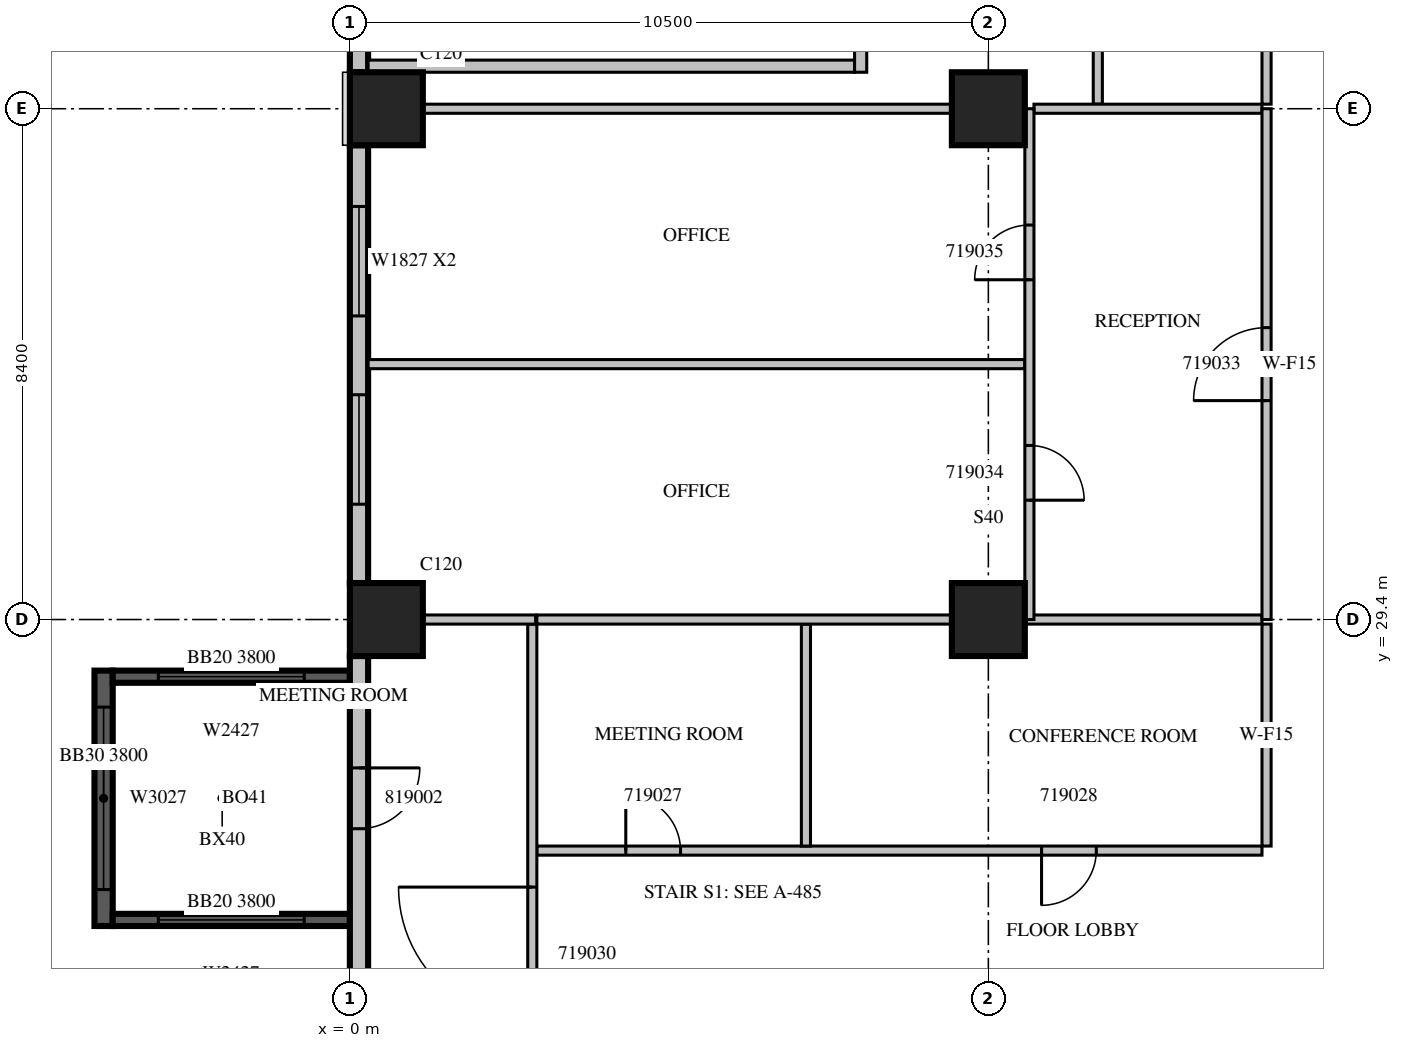
"""IFC4 building model, lengths in metres.
Left out: names, types, materials, properties, quantities, classifications, styles, units other than length and angle.
Written with IfcOpenShell. Run it as: python <this file> out.ifc"""

import sys

from ifc_helpers import new_model, si_unit, direction, frame, frame_2d, origin, origin_2d, place, context, subcontext, project, spatial, rectangle, extrude, source, transform, mapped, element, fill, save


model = new_model("IFC4")
c1 = context("Model", 3, precision=1e-05, world=origin(), true_north=direction((0.0, 1.0)))
c2 = subcontext(c1, "Body", "Model", "MODEL_VIEW")
j1 = project(units=[si_unit("LENGTHUNIT", "METRE"), si_unit("PLANEANGLEUNIT", "RADIAN")], contexts=[c1])
p1 = place(None, origin())
s1 = spatial("IfcSite", under=j1, at=p1, CompositionType="ELEMENT")
p2 = place(p1, origin())
s2 = spatial("IfcBuilding", under=s1, at=p2, CompositionType="ELEMENT")
p3 = place(p2, frame((0.0, 0.0, 90.9)))
s3 = spatial("IfcBuildingStorey", under=s2, at=p3, CompositionType="ELEMENT", Elevation=90.9)
m1 = source(origin(), c2, "Body", "SweptSolid", [
    extrude(rectangle(XDim=1.2, YDim=1.2, at=origin_2d()), origin(), (0.0, 0.0, 1.0), 4.2),
])
for number, where, z_axis, x_axis in (
    (1, (0.6, 29.4, 0.0), (0.0, 0.0, 1.0), (1.0, 0.0, 0.0)),
    (2, (10.5, 29.4, 0.0), (0.0, 0.0, 1.0), (1.0, 0.0, 0.0)),
    (3, (0.6, 37.8, 0.0), (0.0, 0.0, 1.0), (1.0, 0.0, 0.0)),
    (4, (10.5, 37.8, 0.0), (0.0, 0.0, 1.0), (1.0, 0.0, 0.0)),
):
    element("IfcColumn", number, at=place(p3, frame(where, z_axis=z_axis, x_axis=x_axis)), inside=s3, PredefinedType="COLUMN", context=c2, shape_type="MappedRepresentation", body=[
        mapped(m1, transform((0.0, 0.0, 0.0), scale=1.0)),
    ])
m2 = source(origin(), c2, "Body", "SweptSolid", [
    extrude(rectangle(XDim=4.2, YDim=0.3, at=frame_2d((2.1, 0.0))), origin(), (0.0, 0.0, 1.0), 3.8),
])
p4 = place(p3, frame((-4.05, 28.56, 0.0), z_axis=(0.0, 0.0, 1.0), x_axis=(0.0, -1.0, 0.0)))
e5 = element("IfcWall", 5, at=p4, inside=s3, PredefinedType="SOLIDWALL", context=c2, shape_type="MappedRepresentation", body=[
    mapped(m2, transform((0.0, 0.0, 0.0), scale=1.0)),
])
m3 = source(origin(), c2, "Body", "SweptSolid", [
    extrude(rectangle(XDim=3.0, YDim=2.7, at=frame_2d((1.5, 1.35))), frame((0.0, 0.16, 0.0), z_axis=(0.0, -1.0, 0.0), x_axis=(1.0, 0.0, 0.0)), (0.0, 0.0, 1.0), 0.32),
])
p5 = place(p4, frame((0.6, 0.0, 0.6)))
e6 = element("IfcOpeningElement", 6, at=p5, cuts=e5, PredefinedType="OPENING", context=c2, shape_type="MappedRepresentation", body=[
    mapped(m3, transform((0.0, 0.0, 0.0), scale=1.0)),
])
m4 = source(origin(), c2, "Body", "SweptSolid", [
    extrude(rectangle(XDim=3.9, YDim=0.2, at=frame_2d((1.95, 0.0))), origin(), (0.0, 0.0, 1.0), 3.8),
])
p6 = place(p3, frame((0.0, 28.46, 0.0), z_axis=(0.0, 0.0, 1.0), x_axis=(-1.0, 0.0, 0.0)))
e7 = element("IfcWall", 7, at=p6, inside=s3, PredefinedType="SOLIDWALL", context=c2, shape_type="MappedRepresentation", body=[
    mapped(m4, transform((0.0, 0.0, 0.0), scale=1.0)),
])
m5 = source(origin(), c2, "Body", "SweptSolid", [
    extrude(rectangle(XDim=2.4, YDim=2.7, at=frame_2d((1.2, 1.35))), frame((0.0, 0.11, 0.0), z_axis=(0.0, -1.0, 0.0), x_axis=(1.0, 0.0, 0.0)), (0.0, 0.0, 1.0), 0.22),
])
p7 = place(p6, frame((0.75, 0.0, 0.6)))
e8 = element("IfcOpeningElement", 8, at=p7, cuts=e7, PredefinedType="OPENING", context=c2, shape_type="MappedRepresentation", body=[
    mapped(m5, transform((0.0, 0.0, 0.0), scale=1.0)),
])
p8 = place(p3, frame((0.0, 24.46, 0.0), z_axis=(0.0, 0.0, 1.0), x_axis=(-1.0, 0.0, 0.0)))
e9 = element("IfcWall", 9, at=p8, inside=s3, PredefinedType="SOLIDWALL", context=c2, shape_type="MappedRepresentation", body=[
    mapped(m4, transform((0.0, 0.0, 0.0), scale=1.0)),
])
p9 = place(p8, frame((0.75, 0.0, 0.6)))
e10 = element("IfcOpeningElement", 10, at=p9, cuts=e9, PredefinedType="OPENING", context=c2, shape_type="MappedRepresentation", body=[
    mapped(m5, transform((0.0, 0.0, 0.0), scale=1.0)),
])
m6 = source(origin(), c2, "Body", "SweptSolid", [
    extrude(rectangle(XDim=1.8, YDim=0.3, at=frame_2d((0.9, 0.0))), origin(), (0.0, 0.0, 1.0), 3.8),
])
p10 = place(p3, frame((0.15, 40.2, 0.0), z_axis=(0.0, 0.0, 1.0), x_axis=(0.0, -1.0, 0.0)))
e11 = element("IfcWall", 11, at=p10, inside=s3, PredefinedType="STANDARD", context=c2, shape_type="MappedRepresentation", body=[
    mapped(m6, transform((0.0, 0.0, 0.0), scale=1.0)),
])
m7 = source(origin(), c2, "Body", "SweptSolid", [
    extrude(rectangle(XDim=7.2, YDim=0.3, at=frame_2d((3.6, 0.0))), origin(), (0.0, 0.0, 1.0), 3.8),
])
p11 = place(p3, frame((0.15, 37.2, 0.0), z_axis=(0.0, 0.0, 1.0), x_axis=(0.0, -1.0, 0.0)))
e12 = element("IfcWall", 12, at=p11, inside=s3, PredefinedType="STANDARD", context=c2, shape_type="MappedRepresentation", body=[
    mapped(m7, transform((0.0, 0.0, 0.0), scale=1.0)),
])
m8 = source(origin(), c2, "Body", "SweptSolid", [
    extrude(rectangle(XDim=1.8, YDim=2.7, at=frame_2d((0.9, 1.35))), frame((0.0, 0.16, 0.0), z_axis=(0.0, -1.0, 0.0), x_axis=(1.0, 0.0, 0.0)), (0.0, 0.0, 1.0), 0.32),
])
p12 = place(p11, frame((1.008, 0.0, 0.6)))
e13 = element("IfcOpeningElement", 13, at=p12, cuts=e12, PredefinedType="OPENING", context=c2, shape_type="MappedRepresentation", body=[
    mapped(m8, transform((0.0, 0.0, 0.0), scale=1.0)),
])
p13 = place(p11, frame((4.104, 0.0, 0.6)))
e14 = element("IfcOpeningElement", 14, at=p13, cuts=e12, PredefinedType="OPENING", context=c2, shape_type="MappedRepresentation", body=[
    mapped(m8, transform((0.0, 0.0, 0.0), scale=1.0)),
])
p14 = place(p3, frame((0.15, 28.8, 0.0), z_axis=(0.0, 0.0, 1.0), x_axis=(0.0, -1.0, 0.0)))
e15 = element("IfcWall", 15, at=p14, inside=s3, PredefinedType="STANDARD", context=c2, shape_type="MappedRepresentation", body=[
    mapped(m7, transform((0.0, 0.0, 0.0), scale=1.0)),
])
m9 = source(origin(), c2, "Body", "SweptSolid", [
    extrude(rectangle(XDim=1.0, YDim=2.1, at=frame_2d((0.5, 1.05))), frame((0.0, 0.16, 0.0), z_axis=(0.0, -1.0, 0.0), x_axis=(1.0, 0.0, 0.0)), (0.0, 0.0, 1.0), 0.32),
])
p15 = place(p14, frame((1.84, 0.0, 0.0)))
e16 = element("IfcOpeningElement", 16, at=p15, cuts=e15, PredefinedType="OPENING", context=c2, shape_type="MappedRepresentation", body=[
    mapped(m9, transform((0.0, 0.0, 0.0), scale=1.0)),
])
m10 = source(origin(), c2, "Body", "SweptSolid", [
    extrude(rectangle(XDim=8.0, YDim=0.2, at=frame_2d((4.0, 0.0))), origin(), (0.0, 0.0, 1.0), 3.8),
])
p16 = place(p3, frame((0.3, 38.5, 0.0), z_axis=(0.0, 0.0, 1.0), x_axis=(1.0, 0.0, 0.0)))
e17 = element("IfcWall", 17, at=p16, inside=s3, PredefinedType="PARTITIONING", context=c2, shape_type="MappedRepresentation", body=[
    mapped(m10, transform((0.0, 0.0, 0.0), scale=1.0)),
])
m11 = source(origin(), c2, "Body", "SweptSolid", [
    extrude(rectangle(XDim=5.45, YDim=0.2, at=frame_2d((2.725, 0.0))), origin(), (0.0, 0.0, 1.0), 3.8),
])
p17 = place(p3, frame((8.4, 38.4, 0.0), z_axis=(0.0, 0.0, 1.0), x_axis=(0.0, 1.0, 0.0)))
e18 = element("IfcWall", 18, at=p17, inside=s3, PredefinedType="PARTITIONING", context=c2, shape_type="MappedRepresentation", body=[
    mapped(m11, transform((0.0, 0.0, 0.0), scale=1.0)),
])
m12 = source(origin(), c2, "Body", "SweptSolid", [
    extrude(rectangle(XDim=1.2, YDim=2.1, at=frame_2d((0.6, 1.05))), frame((0.0, 0.11, 0.0), z_axis=(0.0, -1.0, 0.0), x_axis=(1.0, 0.0, 0.0)), (0.0, 0.0, 1.0), 0.22),
])
p18 = place(p17, frame((0.4, 0.0, 0.0)))
e19 = element("IfcOpeningElement", 19, at=p18, cuts=e18, PredefinedType="OPENING", context=c2, shape_type="MappedRepresentation", body=[
    mapped(m12, transform((0.0, 0.0, 0.0), scale=1.0)),
])
m13 = source(origin(), c2, "Body", "SweptSolid", [
    extrude(rectangle(XDim=0.9, YDim=2.1, at=frame_2d((0.45, 1.05))), frame((0.0, 0.11, 0.0), z_axis=(0.0, -1.0, 0.0), x_axis=(1.0, 0.0, 0.0)), (0.0, 0.0, 1.0), 0.22),
])
p19 = place(p17, frame((3.25, 0.0, 0.0)))
e20 = element("IfcOpeningElement", 20, at=p19, cuts=e18, PredefinedType="OPENING", context=c2, shape_type="MappedRepresentation", body=[
    mapped(m13, transform((0.0, 0.0, 0.0), scale=1.0)),
])
m14 = source(origin(), c2, "Body", "SweptSolid", [
    extrude(rectangle(XDim=11.925, YDim=0.15, at=frame_2d((5.963, 0.0))), origin(), (0.0, 0.0, 1.0), 3.8),
])
p20 = place(p3, frame((3.075, 25.6, 0.0), z_axis=(0.0, 0.0, 1.0), x_axis=(1.0, 0.0, 0.0)))
e21 = element("IfcWall", 21, at=p20, inside=s3, PredefinedType="PARTITIONING", context=c2, shape_type="MappedRepresentation", body=[
    mapped(m14, transform((0.0, 0.0, 0.0), scale=1.0)),
])
m15 = source(origin(), c2, "Body", "SweptSolid", [
    extrude(rectangle(XDim=0.9, YDim=2.1, at=frame_2d((0.45, 1.05))), frame((0.0, 0.085, 0.0), z_axis=(0.0, -1.0, 0.0), x_axis=(1.0, 0.0, 0.0)), (0.0, 0.0, 1.0), 0.17),
])
p21 = place(p20, frame((1.462, 0.0, 0.0)))
e22 = element("IfcOpeningElement", 22, at=p21, cuts=e21, PredefinedType="OPENING", context=c2, shape_type="MappedRepresentation", body=[
    mapped(m15, transform((0.0, 0.0, 0.0), scale=1.0)),
])
p22 = place(p20, frame((8.3, 0.0, 0.0)))
e23 = element("IfcOpeningElement", 23, at=p22, cuts=e21, PredefinedType="OPENING", context=c2, shape_type="MappedRepresentation", body=[
    mapped(m15, transform((0.0, 0.0, 0.0), scale=1.0)),
])
m16 = source(origin(), c2, "Body", "SweptSolid", [
    extrude(rectangle(XDim=3.65, YDim=0.15, at=frame_2d((1.825, 0.0))), origin(), (0.0, 0.0, 1.0), 3.8),
])
for number, where, z_axis, x_axis in (
    (24, (7.5, 25.675, 0.0), (0.0, 0.0, 1.0), (0.0, 1.0, 0.0)),
    (25, (15.075, 25.675, 0.0), (0.0, 0.0, 1.0), (0.0, 1.0, 0.0)),
):
    element("IfcWall", number, at=place(p3, frame(where, z_axis=z_axis, x_axis=x_axis)), inside=s3, PredefinedType="PARTITIONING", context=c2, shape_type="MappedRepresentation", body=[
        mapped(m16, transform((0.0, 0.0, 0.0), scale=1.0)),
    ])
m17 = source(origin(), c2, "Body", "SweptSolid", [
    extrude(rectangle(XDim=6.826, YDim=0.15, at=frame_2d((3.413, 0.0))), origin(), (0.0, 0.0, 1.0), 3.8),
])
p23 = place(p3, frame((9.901, 29.4, 0.0), z_axis=(0.0, 0.0, 1.0), x_axis=(-1.0, 0.0, 0.0)))
e26 = element("IfcWall", 26, at=p23, inside=s3, PredefinedType="PARTITIONING", context=c2, shape_type="MappedRepresentation", body=[
    mapped(m17, transform((0.0, 0.0, 0.0), scale=1.0)),
])
m18 = source(origin(), c2, "Body", "SweptSolid", [
    extrude(rectangle(XDim=3.901, YDim=0.15, at=frame_2d((1.95, 0.0))), origin(), (0.0, 0.0, 1.0), 3.8),
])
p24 = place(p3, frame((15.0, 29.4, 0.0), z_axis=(0.0, 0.0, 1.0), x_axis=(-1.0, 0.0, 0.0)))
e27 = element("IfcWall", 27, at=p24, inside=s3, PredefinedType="PARTITIONING", context=c2, shape_type="MappedRepresentation", body=[
    mapped(m18, transform((0.0, 0.0, 0.0), scale=1.0)),
])
m19 = source(origin(), c2, "Body", "SweptSolid", [
    extrude(rectangle(XDim=7.125, YDim=0.15, at=frame_2d((3.562, 0.0))), origin(), (0.0, 0.0, 1.0), 3.8),
])
p25 = place(p3, frame((3.0, 29.325, 0.0), z_axis=(0.0, 0.0, 1.0), x_axis=(0.0, -1.0, 0.0)))
e28 = element("IfcWall", 28, at=p25, inside=s3, PredefinedType="PARTITIONING", context=c2, shape_type="MappedRepresentation", body=[
    mapped(m19, transform((0.0, 0.0, 0.0), scale=1.0)),
])
m20 = source(origin(), c2, "Body", "SweptSolid", [
    extrude(rectangle(XDim=2.2, YDim=2.1, at=frame_2d((1.1, 1.05))), frame((0.0, 0.085, 0.0), z_axis=(0.0, -1.0, 0.0), x_axis=(1.0, 0.0, 0.0)), (0.0, 0.0, 1.0), 0.17),
])
p26 = place(p25, frame((4.325, 0.0, 0.0)))
e29 = element("IfcOpeningElement", 29, at=p26, cuts=e28, PredefinedType="OPENING", context=c2, shape_type="MappedRepresentation", body=[
    mapped(m20, transform((0.0, 0.0, 0.0), scale=1.0)),
])
m21 = source(origin(), c2, "Body", "SweptSolid", [
    extrude(rectangle(XDim=6.45, YDim=0.15, at=frame_2d((3.225, 0.0))), origin(), (0.0, 0.0, 1.0), 3.8),
])
p27 = place(p3, frame((12.3, 44.325, 0.0), z_axis=(0.0, 0.0, 1.0), x_axis=(0.0, -1.0, 0.0)))
e30 = element("IfcWall", 30, at=p27, inside=s3, PredefinedType="PARTITIONING", context=c2, shape_type="MappedRepresentation", body=[
    mapped(m21, transform((0.0, 0.0, 0.0), scale=1.0)),
])
p28 = place(p3, frame((15.075, 37.875, 0.0), z_axis=(0.0, 0.0, 1.0), x_axis=(0.0, 1.0, 0.0)))
e31 = element("IfcWall", 31, at=p28, inside=s3, PredefinedType="PARTITIONING", context=c2, shape_type="MappedRepresentation", body=[
    mapped(m21, transform((0.0, 0.0, 0.0), scale=1.0)),
])
p29 = place(p28, frame((2.737, 0.0, 0.0)))
e32 = element("IfcOpeningElement", 32, at=p29, cuts=e31, PredefinedType="OPENING", context=c2, shape_type="MappedRepresentation", body=[
    mapped(m15, transform((0.0, 0.0, 0.0), scale=1.0)),
])
m22 = source(origin(), c2, "Body", "SweptSolid", [
    extrude(rectangle(XDim=10.8, YDim=0.15, at=frame_2d((5.4, 0.0))), origin(), (0.0, 0.0, 1.0), 3.8),
])
p30 = place(p3, frame((11.1, 33.6, 0.0), z_axis=(0.0, 0.0, 1.0), x_axis=(-1.0, 0.0, 0.0)))
e33 = element("IfcWall", 33, at=p30, inside=s3, PredefinedType="PARTITIONING", context=c2, shape_type="MappedRepresentation", body=[
    mapped(m22, transform((0.0, 0.0, 0.0), scale=1.0)),
])
m23 = source(origin(), c2, "Body", "SweptSolid", [
    extrude(rectangle(XDim=1.856, YDim=0.15, at=frame_2d((0.928, 0.0))), origin(), (0.0, 0.0, 1.0), 3.8),
])
p31 = place(p3, frame((3.055, 29.4, 0.0), z_axis=(0.0, 0.0, 1.0), x_axis=(-1.0, 0.0, 0.0)))
e34 = element("IfcWall", 34, at=p31, inside=s3, PredefinedType="PARTITIONING", context=c2, shape_type="MappedRepresentation", body=[
    mapped(m23, transform((0.0, 0.0, 0.0), scale=1.0)),
])
m24 = source(origin(), c2, "Body", "SweptSolid", [
    extrude(rectangle(XDim=8.702, YDim=0.15, at=frame_2d((4.351, 0.0))), origin(), (0.0, 0.0, 1.0), 3.8),
])
p32 = place(p3, frame((9.901, 37.8, 0.0), z_axis=(0.0, 0.0, 1.0), x_axis=(-1.0, 0.0, 0.0)))
e35 = element("IfcWall", 35, at=p32, inside=s3, PredefinedType="PARTITIONING", context=c2, shape_type="MappedRepresentation", body=[
    mapped(m24, transform((0.0, 0.0, 0.0), scale=1.0)),
])
m25 = source(origin(), c2, "Body", "SweptSolid", [
    extrude(rectangle(XDim=3.75, YDim=0.15, at=frame_2d((1.875, 0.0))), origin(), (0.0, 0.0, 1.0), 3.8),
])
p33 = place(p3, frame((15.0, 37.8, 0.0), z_axis=(0.0, 0.0, 1.0), x_axis=(-1.0, 0.0, 0.0)))
e36 = element("IfcWall", 36, at=p33, inside=s3, PredefinedType="PARTITIONING", context=c2, shape_type="MappedRepresentation", body=[
    mapped(m25, transform((0.0, 0.0, 0.0), scale=1.0)),
])
m26 = source(origin(), c2, "Body", "SweptSolid", [
    extrude(rectangle(XDim=8.4, YDim=0.15, at=frame_2d((4.2, 0.0))), origin(), (0.0, 0.0, 1.0), 3.8),
])
p34 = place(p3, frame((11.175, 29.4, 0.0), z_axis=(0.0, 0.0, 1.0), x_axis=(0.0, 1.0, 0.0)))
e37 = element("IfcWall", 37, at=p34, inside=s3, PredefinedType="PARTITIONING", context=c2, shape_type="MappedRepresentation", body=[
    mapped(m26, transform((0.0, 0.0, 0.0), scale=1.0)),
])
p35 = place(p34, frame((1.962, 0.0, 0.0)))
e38 = element("IfcOpeningElement", 38, at=p35, cuts=e37, PredefinedType="OPENING", context=c2, shape_type="MappedRepresentation", body=[
    mapped(m15, transform((0.0, 0.0, 0.0), scale=1.0)),
])
p36 = place(p34, frame((5.588, 0.0, 0.0)))
e39 = element("IfcOpeningElement", 39, at=p36, cuts=e37, PredefinedType="OPENING", context=c2, shape_type="MappedRepresentation", body=[
    mapped(m15, transform((0.0, 0.0, 0.0), scale=1.0)),
])
p37 = place(p3, frame((15.075, 29.4, 0.0), z_axis=(0.0, 0.0, 1.0), x_axis=(0.0, 1.0, 0.0)))
e40 = element("IfcWall", 40, at=p37, inside=s3, PredefinedType="PARTITIONING", context=c2, shape_type="MappedRepresentation", body=[
    mapped(m26, transform((0.0, 0.0, 0.0), scale=1.0)),
])
m27 = source(origin(), c2, "Body", "SweptSolid", [
    extrude(rectangle(XDim=1.2, YDim=2.1, at=frame_2d((0.6, 1.05))), frame((0.0, 0.085, 0.0), z_axis=(0.0, -1.0, 0.0), x_axis=(1.0, 0.0, 0.0)), (0.0, 0.0, 1.0), 0.17),
])
p38 = place(p37, frame((3.6, 0.0, 0.0)))
e41 = element("IfcOpeningElement", 41, at=p38, cuts=e40, PredefinedType="OPENING", context=c2, shape_type="MappedRepresentation", body=[
    mapped(m27, transform((0.0, 0.0, 0.0), scale=1.0)),
])
m28 = source(origin(), c2, "Body", "SweptSolid", [
    extrude(rectangle(XDim=3.0, YDim=2.7, at=frame_2d((1.5, 1.35))), frame((0.0, 0.03, 0.0), z_axis=(0.0, -1.0, 0.0), x_axis=(1.0, 0.0, 0.0)), (0.0, 0.0, 1.0), 0.06),
])
p39 = place(p5, origin())
e42 = element("IfcWindow", 42, at=p39, inside=s3, PartitioningType="SINGLE_PANEL", PredefinedType="WINDOW", context=c2, shape_type="MappedRepresentation", body=[
    mapped(m28, transform((0.0, 0.0, 0.0), scale=1.0)),
])
fill(e6, e42)
m29 = source(origin(), c2, "Body", "SweptSolid", [
    extrude(rectangle(XDim=2.4, YDim=2.7, at=frame_2d((1.2, 1.35))), frame((0.0, 0.03, 0.0), z_axis=(0.0, -1.0, 0.0), x_axis=(1.0, 0.0, 0.0)), (0.0, 0.0, 1.0), 0.06),
])
p40 = place(p7, origin())
e43 = element("IfcWindow", 43, at=p40, inside=s3, PartitioningType="SINGLE_PANEL", PredefinedType="WINDOW", context=c2, shape_type="MappedRepresentation", body=[
    mapped(m29, transform((0.0, 0.0, 0.0), scale=1.0)),
])
fill(e8, e43)
p41 = place(p9, origin())
e44 = element("IfcWindow", 44, at=p41, inside=s3, PartitioningType="SINGLE_PANEL", PredefinedType="WINDOW", context=c2, shape_type="MappedRepresentation", body=[
    mapped(m29, transform((0.0, 0.0, 0.0), scale=1.0)),
])
fill(e10, e44)
m30 = source(origin(), c2, "Body", "SweptSolid", [
    extrude(rectangle(XDim=1.8, YDim=2.7, at=frame_2d((0.9, 1.35))), frame((0.0, 0.03, 0.0), z_axis=(0.0, -1.0, 0.0), x_axis=(1.0, 0.0, 0.0)), (0.0, 0.0, 1.0), 0.06),
])
p42 = place(p12, origin())
e45 = element("IfcWindow", 45, at=p42, inside=s3, PartitioningType="SINGLE_PANEL", PredefinedType="WINDOW", context=c2, shape_type="MappedRepresentation", body=[
    mapped(m30, transform((0.0, 0.0, 0.0), scale=1.0)),
])
fill(e13, e45)
p43 = place(p13, origin())
e46 = element("IfcWindow", 46, at=p43, inside=s3, PartitioningType="SINGLE_PANEL", PredefinedType="WINDOW", context=c2, shape_type="MappedRepresentation", body=[
    mapped(m30, transform((0.0, 0.0, 0.0), scale=1.0)),
])
fill(e14, e46)
m31 = source(origin(), c2, "Body", "SweptSolid", [
    extrude(rectangle(XDim=0.9, YDim=2.1, at=frame_2d((0.45, 1.05))), frame((0.0, 0.025, 0.0), z_axis=(0.0, -1.0, 0.0), x_axis=(1.0, 0.0, 0.0)), (0.0, 0.0, 1.0), 0.05),
])
p44 = place(p21, origin())
e47 = element("IfcDoor", 47, at=p44, inside=s3, OperationType="SINGLE_SWING_LEFT", PredefinedType="DOOR", context=c2, shape_type="MappedRepresentation", body=[
    mapped(m31, transform((0.0, 0.0, 0.0), scale=1.0)),
])
fill(e22, e47)
p45 = place(p22, origin())
e48 = element("IfcDoor", 48, at=p45, inside=s3, OperationType="SINGLE_SWING_RIGHT", PredefinedType="DOOR", context=c2, shape_type="MappedRepresentation", body=[
    mapped(m31, transform((0.0, 0.0, 0.0), scale=1.0)),
])
fill(e23, e48)
m32 = source(origin(), c2, "Body", "SweptSolid", [
    extrude(rectangle(XDim=2.2, YDim=2.1, at=frame_2d((1.1, 1.05))), frame((0.0, 0.025, 0.0), z_axis=(0.0, -1.0, 0.0), x_axis=(1.0, 0.0, 0.0)), (0.0, 0.0, 1.0), 0.05),
])
p46 = place(p26, origin())
e49 = element("IfcDoor", 49, at=p46, inside=s3, OperationType="DOUBLE_DOOR_SINGLE_SWING", PredefinedType="DOOR", context=c2, shape_type="MappedRepresentation", body=[
    mapped(m32, transform((0.0, 0.0, 0.0), scale=1.0)),
])
fill(e29, e49)
m33 = source(origin(), c2, "Body", "SweptSolid", [
    extrude(rectangle(XDim=1.2, YDim=2.1, at=frame_2d((0.6, 1.05))), frame((0.0, 0.025, 0.0), z_axis=(0.0, -1.0, 0.0), x_axis=(1.0, 0.0, 0.0)), (0.0, 0.0, 1.0), 0.05),
])
p47 = place(p38, origin())
e50 = element("IfcDoor", 50, at=p47, inside=s3, OperationType="SINGLE_SWING_LEFT", PredefinedType="DOOR", context=c2, shape_type="MappedRepresentation", body=[
    mapped(m33, transform((0.0, 0.0, 0.0), scale=1.0)),
])
fill(e41, e50)
p48 = place(p35, origin())
e51 = element("IfcDoor", 51, at=p48, inside=s3, OperationType="SINGLE_SWING_RIGHT", PredefinedType="DOOR", context=c2, shape_type="MappedRepresentation", body=[
    mapped(m31, transform((0.0, 0.0, 0.0), scale=1.0)),
])
fill(e38, e51)
p49 = place(p36, origin())
e52 = element("IfcDoor", 52, at=p49, inside=s3, OperationType="SINGLE_SWING_LEFT", PredefinedType="DOOR", context=c2, shape_type="MappedRepresentation", body=[
    mapped(m31, transform((0.0, 0.0, 0.0), scale=1.0)),
])
fill(e39, e52)
m34 = source(origin(), c2, "Body", "SweptSolid", [
    extrude(rectangle(XDim=1.0, YDim=2.1, at=frame_2d((0.5, 1.05))), frame((0.0, 0.025, 0.0), z_axis=(0.0, -1.0, 0.0), x_axis=(1.0, 0.0, 0.0)), (0.0, 0.0, 1.0), 0.05),
])
p50 = place(p15, origin())
e53 = element("IfcDoor", 53, at=p50, inside=s3, OperationType="SINGLE_SWING_LEFT", PredefinedType="DOOR", context=c2, shape_type="MappedRepresentation", body=[
    mapped(m34, transform((0.0, 0.0, 0.0), scale=1.0)),
])
fill(e16, e53)
save(model, sys.argv[1])
